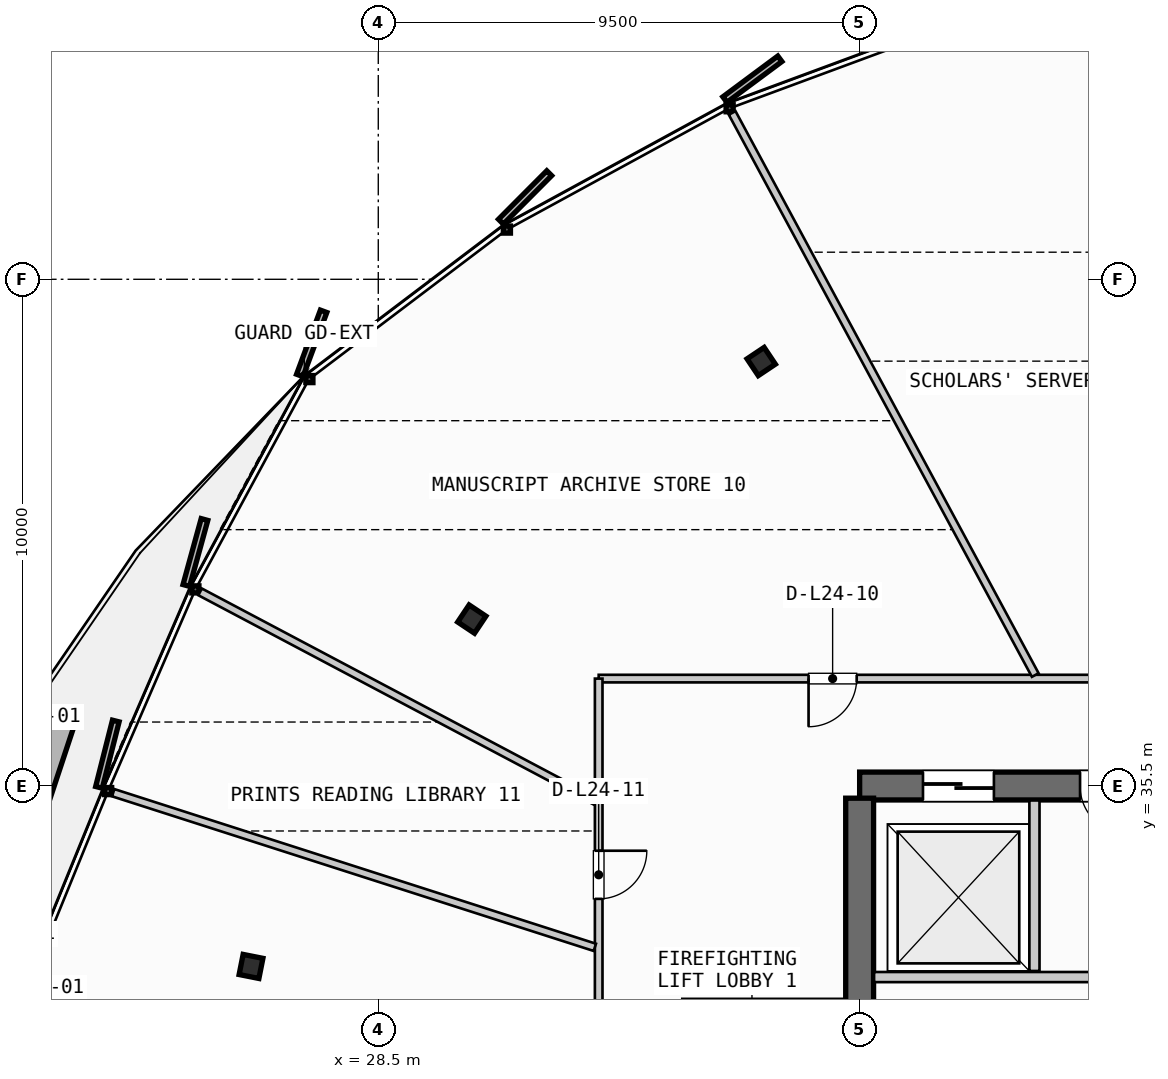
"""IFC4 building model, lengths in metres.
Left out: names, types, materials, properties, quantities, classifications, styles, units other than length and angle.
Written with IfcOpenShell. Run it as: python <this file> out.ifc"""

import sys

from ifc_helpers import new_model, si_unit, direction, frame, frame_2d, origin, origin_2d, place, context, subcontext, project, spatial, rectangle, i_section, extrude, source, transform, mapped, element, fill, save


model = new_model("IFC4")
c1 = context("Model", 3, precision=1e-05, world=origin(), true_north=direction((0.0, 1.0)))
c2 = subcontext(c1, "Body", "Model", "MODEL_VIEW")
j1 = project(units=[si_unit("LENGTHUNIT", "METRE"), si_unit("PLANEANGLEUNIT", "RADIAN")], contexts=[c1])
p1 = place(None, origin())
s1 = spatial("IfcSite", under=j1, at=p1, CompositionType="ELEMENT")
p2 = place(p1, origin())
s2 = spatial("IfcBuilding", under=s1, at=p2, CompositionType="ELEMENT")
p3 = place(p2, frame((0.0, 0.0, 100.0)))
s3 = spatial("IfcBuildingStorey", under=s2, at=p3, CompositionType="ELEMENT", Elevation=100.0)
p4 = place(p3, frame((55.6, 35.5, 0.0), z_axis=(0.0, 0.0, 1.0), x_axis=(-1.0, 0.0, 0.0)))
e1 = element("IfcWall", 1, at=p4, inside=s3, PredefinedType="SHEAR", context=c2, shape_type="SweptSolid", body=[
    extrude(rectangle(XDim=17.6, YDim=0.55, at=frame_2d((8.8, 0.0))), origin(), (0.0, 0.0, 1.0), 3.35),
])
p5 = place(p4, frame((8.05, 0.0, 0.0)))
e2 = element("IfcOpeningElement", 2, at=p5, cuts=e1, PredefinedType="OPENING", context=c2, shape_type="SweptSolid", body=[
    extrude(rectangle(XDim=1.5, YDim=2.2, at=frame_2d((0.75, 1.1))), frame((0.0, 0.285, 0.0), z_axis=(0.0, -1.0, 0.0), x_axis=(1.0, 0.0, 0.0)), (0.0, 0.0, 1.0), 0.57),
])
p6 = place(p4, frame((14.95, 0.0, 0.0)))
e3 = element("IfcOpeningElement", 3, at=p6, cuts=e1, PredefinedType="OPENING", context=c2, shape_type="SweptSolid", body=[
    extrude(rectangle(XDim=1.4, YDim=2.3, at=frame_2d((0.7, 1.15))), frame((0.0, 0.285, 0.0), z_axis=(0.0, -1.0, 0.0), x_axis=(1.0, 0.0, 0.0)), (0.0, 0.0, 1.0), 0.57),
])
p7 = place(p4, frame((12.3, 0.0, 0.0)))
e4 = element("IfcOpeningElement", 4, at=p7, cuts=e1, PredefinedType="OPENING", context=c2, shape_type="SweptSolid", body=[
    extrude(rectangle(XDim=0.95, YDim=2.15, at=frame_2d((0.475, 1.075))), frame((0.0, 0.285, 0.0), z_axis=(0.0, -1.0, 0.0), x_axis=(1.0, 0.0, 0.0)), (0.0, 0.0, 1.0), 0.57),
])
p8 = place(p4, frame((10.2, 0.0, 0.0)))
e5 = element("IfcOpeningElement", 5, at=p8, cuts=e1, PredefinedType="OPENING", context=c2, shape_type="SweptSolid", body=[
    extrude(rectangle(XDim=0.9, YDim=2.15, at=frame_2d((0.45, 1.075))), frame((0.0, 0.285, 0.0), z_axis=(0.0, -1.0, 0.0), x_axis=(1.0, 0.0, 0.0)), (0.0, 0.0, 1.0), 0.57),
])
p9 = place(p3, frame((38.0, 35.26, 0.0), z_axis=(0.0, 0.0, 1.0), x_axis=(0.0, -1.0, 0.0)))
e6 = element("IfcWall", 6, at=p9, inside=s3, PredefinedType="SHEAR", context=c2, shape_type="SweptSolid", body=[
    extrude(rectangle(XDim=14.92, YDim=0.55, at=frame_2d((7.46, 0.0))), origin(), (0.0, 0.0, 1.0), 3.35),
])
p10 = place(p9, frame((5.21, 0.0, 0.0)))
e7 = element("IfcOpeningElement", 7, at=p10, cuts=e6, PredefinedType="OPENING", context=c2, shape_type="SweptSolid", body=[
    extrude(rectangle(XDim=1.1, YDim=2.2, at=frame_2d((0.55, 1.1))), frame((0.0, 0.285, 0.0), z_axis=(0.0, -1.0, 0.0), x_axis=(1.0, 0.0, 0.0)), (0.0, 0.0, 1.0), 0.57),
])
m1 = source(origin(), c2, "Body", "SweptSolid", [
    extrude(i_section(OverallWidth=0.405, OverallDepth=0.398, WebThickness=0.035, FlangeThickness=0.056, FilletRadius=0.015, at=origin_2d()), origin(), (0.0, 0.0, 1.0), 3.35),
])
for number, where, z_axis, x_axis in (
    (8, (36.058, 43.877, 0.0), (0.0, 0.0, 1.0), (-0.556, 0.831, 0.0)),
    (9, (30.346, 38.794, 0.0), (0.0, 0.0, 1.0), (-0.831, 0.556, 0.0)),
    (10, (25.989, 31.94, 0.0), (0.0, 0.0, 1.0), (-0.981, 0.195, 0.0)),
):
    element("IfcColumn", number, at=place(p3, frame(where, z_axis=z_axis, x_axis=x_axis)), inside=s3, PredefinedType="COLUMN", context=c2, shape_type="MappedRepresentation", body=[
        mapped(m1, transform((0.0, 0.0, 0.0), scale=1.0)),
    ])
p11 = place(p3, frame((34.5, 31.2, 0.0), z_axis=(0.0, 0.0, 1.0), x_axis=(1.0, 0.0, 0.0)))
e11 = element("IfcWall", 11, at=p11, inside=s3, PredefinedType="PARTITIONING", context=c2, shape_type="SweptSolid", body=[
    extrude(rectangle(XDim=3.215, YDim=0.2, at=frame_2d((1.607, 0.0))), origin(), (0.0, 0.0, 1.0), 2.28),
])
p12 = place(p3, frame((41.45, 31.85, 0.0), z_axis=(0.0, 0.0, 1.0), x_axis=(0.0, 1.0, 0.0)))
e12 = element("IfcWall", 12, at=p12, inside=s3, PredefinedType="PARTITIONING", context=c2, shape_type="SweptSolid", body=[
    extrude(rectangle(XDim=3.365, YDim=0.2, at=frame_2d((1.683, 0.0))), origin(), (0.0, 0.0, 1.0), 2.28),
])
p13 = place(p3, frame((38.285, 31.73, 0.0), z_axis=(0.0, 0.0, 1.0), x_axis=(1.0, 0.0, 0.0)))
e13 = element("IfcWall", 13, at=p13, inside=s3, PredefinedType="PARTITIONING", context=c2, shape_type="SweptSolid", body=[
    extrude(rectangle(XDim=7.515, YDim=0.2, at=frame_2d((3.758, 0.0))), origin(), (0.0, 0.0, 1.0), 2.28),
])
p14 = place(p3, frame((61.27, 37.62, 0.0), z_axis=(0.0, 0.0, 1.0), x_axis=(-1.0, 0.0, 0.0)))
e14 = element("IfcWall", 14, at=p14, inside=s3, PredefinedType="PARTITIONING", context=c2, shape_type="SweptSolid", body=[
    extrude(rectangle(XDim=28.42, YDim=0.15, at=frame_2d((14.21, 0.0))), origin(), (0.0, 0.0, 1.0), 2.28),
])
p15 = place(p14, frame((4.139, 0.0, 0.0)))
e15 = element("IfcOpeningElement", 15, at=p15, cuts=e14, PredefinedType="OPENING", context=c2, shape_type="SweptSolid", body=[
    extrude(rectangle(XDim=0.95, YDim=2.15, at=frame_2d((0.475, 1.075))), frame((0.0, 0.085, 0.0), z_axis=(0.0, -1.0, 0.0), x_axis=(1.0, 0.0, 0.0)), (0.0, 0.0, 1.0), 0.17),
])
p16 = place(p14, frame((11.405, 0.0, 0.0)))
e16 = element("IfcOpeningElement", 16, at=p16, cuts=e14, PredefinedType="OPENING", context=c2, shape_type="SweptSolid", body=[
    extrude(rectangle(XDim=0.95, YDim=2.15, at=frame_2d((0.475, 1.075))), frame((0.0, 0.085, 0.0), z_axis=(0.0, -1.0, 0.0), x_axis=(1.0, 0.0, 0.0)), (0.0, 0.0, 1.0), 0.17),
])
p17 = place(p14, frame((17.005, 0.0, 0.0)))
e17 = element("IfcOpeningElement", 17, at=p17, cuts=e14, PredefinedType="OPENING", context=c2, shape_type="SweptSolid", body=[
    extrude(rectangle(XDim=0.95, YDim=2.15, at=frame_2d((0.475, 1.075))), frame((0.0, 0.085, 0.0), z_axis=(0.0, -1.0, 0.0), x_axis=(1.0, 0.0, 0.0)), (0.0, 0.0, 1.0), 0.17),
])
p18 = place(p14, frame((23.328, 0.0, 0.0)))
e18 = element("IfcOpeningElement", 18, at=p18, cuts=e14, PredefinedType="OPENING", context=c2, shape_type="SweptSolid", body=[
    extrude(rectangle(XDim=0.95, YDim=2.15, at=frame_2d((0.475, 1.075))), frame((0.0, 0.085, 0.0), z_axis=(0.0, -1.0, 0.0), x_axis=(1.0, 0.0, 0.0)), (0.0, 0.0, 1.0), 0.17),
])
p19 = place(p3, frame((32.85, 37.62, 0.0), z_axis=(0.0, 0.0, 1.0), x_axis=(0.0, -1.0, 0.0)))
e19 = element("IfcWall", 19, at=p19, inside=s3, PredefinedType="PARTITIONING", context=c2, shape_type="SweptSolid", body=[
    extrude(rectangle(XDim=20.48, YDim=0.15, at=frame_2d((10.24, 0.0))), origin(), (0.0, 0.0, 1.0), 2.28),
])
p20 = place(p19, frame((3.397, 0.0, 0.0)))
e20 = element("IfcOpeningElement", 20, at=p20, cuts=e19, PredefinedType="OPENING", context=c2, shape_type="SweptSolid", body=[
    extrude(rectangle(XDim=0.95, YDim=2.15, at=frame_2d((0.475, 1.075))), frame((0.0, 0.085, 0.0), z_axis=(0.0, -1.0, 0.0), x_axis=(1.0, 0.0, 0.0)), (0.0, 0.0, 1.0), 0.17),
])
p21 = place(p19, frame((12.132, 0.0, 0.0)))
e21 = element("IfcOpeningElement", 21, at=p21, cuts=e19, PredefinedType="OPENING", context=c2, shape_type="SweptSolid", body=[
    extrude(rectangle(XDim=0.95, YDim=2.15, at=frame_2d((0.475, 1.075))), frame((0.0, 0.085, 0.0), z_axis=(0.0, -1.0, 0.0), x_axis=(1.0, 0.0, 0.0)), (0.0, 0.0, 1.0), 0.17),
])
p22 = place(p3, frame((41.466, 37.69, 0.0), z_axis=(0.0, 0.0, 1.0), x_axis=(-0.474648473647, 0.880175452091, 0.0)))
e22 = element("IfcWall", 22, at=p22, inside=s3, PredefinedType="PARTITIONING", context=c2, shape_type="SweptSolid", body=[
    extrude(rectangle(XDim=12.602, YDim=0.15, at=frame_2d((6.301, 0.0))), origin(), (0.0, 0.0, 1.0), 2.28),
])
p23 = place(p3, frame((32.779, 35.205, 0.0), z_axis=(0.0, 0.0, 1.0), x_axis=(-0.883812825264, 0.467840667213, 0.0)))
e23 = element("IfcWall", 23, at=p23, inside=s3, PredefinedType="PARTITIONING", context=c2, shape_type="SweptSolid", body=[
    extrude(rectangle(XDim=8.821, YDim=0.15, at=frame_2d((4.41, 0.0))), origin(), (0.0, 0.0, 1.0), 2.28),
])
p24 = place(p3, frame((32.774, 32.316, 0.0), z_axis=(0.0, 0.0, 1.0), x_axis=(-0.952129526553, 0.30569488819, 0.0)))
e24 = element("IfcWall", 24, at=p24, inside=s3, PredefinedType="PARTITIONING", context=c2, shape_type="SweptSolid", body=[
    extrude(rectangle(XDim=9.983, YDim=0.15, at=frame_2d((4.991, 0.0))), origin(), (0.0, 0.0, 1.0), 2.28),
])
m2 = source(origin(), c2, "Body", "SweptSolid", [
    extrude(rectangle(XDim=1.4, YDim=2.3, at=frame_2d((0.7, 1.15))), frame((0.0, 0.025, 0.0), z_axis=(0.0, -1.0, 0.0), x_axis=(1.0, 0.0, 0.0)), (0.0, 0.0, 1.0), 0.05),
])
p25 = place(p6, origin())
e25 = element("IfcDoor", 25, at=p25, inside=s3, OperationType="SLIDING_TO_RIGHT", PredefinedType="DOOR", context=c2, shape_type="MappedRepresentation", body=[
    mapped(m2, transform((0.0, 0.0, 0.0), scale=1.0)),
])
fill(e3, e25)
m3 = source(origin(), c2, "Body", "SweptSolid", [
    extrude(rectangle(XDim=0.95, YDim=2.15, at=frame_2d((0.475, 1.075))), frame((0.0, 0.025, 0.0), z_axis=(0.0, -1.0, 0.0), x_axis=(1.0, 0.0, 0.0)), (0.0, 0.0, 1.0), 0.05),
])
p26 = place(p7, origin())
e26 = element("IfcDoor", 26, at=p26, inside=s3, OperationType="SINGLE_SWING_LEFT", PredefinedType="DOOR", context=c2, shape_type="MappedRepresentation", body=[
    mapped(m3, transform((0.0, 0.0, 0.0), scale=1.0)),
])
fill(e4, e26)
p27 = place(p18, origin())
e27 = element("IfcDoor", 27, at=p27, inside=s3, OperationType="SINGLE_SWING_RIGHT", PredefinedType="DOOR", context=c2, shape_type="MappedRepresentation", body=[
    mapped(m3, transform((0.0, 0.0, 0.0), scale=1.0)),
])
fill(e18, e27)
p28 = place(p20, origin())
e28 = element("IfcDoor", 28, at=p28, inside=s3, OperationType="SINGLE_SWING_LEFT", PredefinedType="DOOR", context=c2, shape_type="MappedRepresentation", body=[
    mapped(m3, transform((0.0, 0.0, 0.0), scale=1.0)),
])
fill(e20, e28)
save(model, sys.argv[1])
